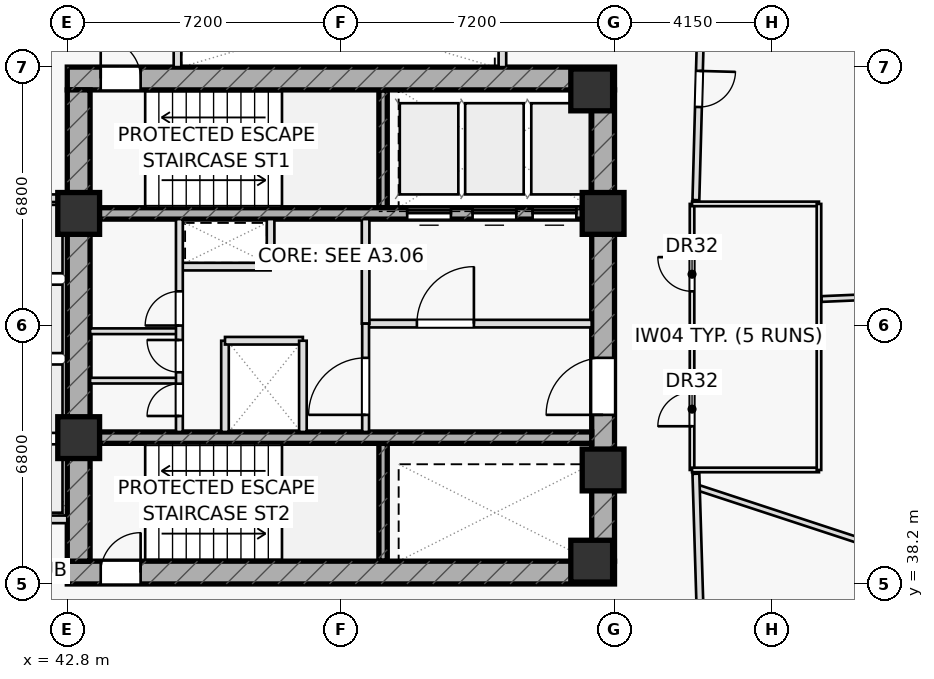
"""IFC4 building model, lengths in metres.
Left out: names, types, materials, properties, quantities, classifications, styles, units other than length and angle.
Written with IfcOpenShell. Run it as: python <this file> out.ifc"""

import sys

from ifc_helpers import new_model, si_unit, direction, frame, frame_2d, origin, origin_2d, place, context, subcontext, project, spatial, rectangle, extrude, element, fill, save


model = new_model("IFC4")
c1 = context("Model", 3, precision=1e-05, world=origin(), true_north=direction((0.0, 1.0)))
c2 = subcontext(c1, "Body", "Model", "MODEL_VIEW")
j1 = project(units=[si_unit("LENGTHUNIT", "METRE"), si_unit("PLANEANGLEUNIT", "RADIAN")], contexts=[c1])
p1 = place(None, origin())
s1 = spatial("IfcSite", under=j1, at=p1, CompositionType="ELEMENT")
p2 = place(p1, origin())
s2 = spatial("IfcBuilding", under=s1, at=p2, CompositionType="ELEMENT")
p3 = place(p2, frame((0.0, 0.0, 39.3)))
s3 = spatial("IfcBuildingStorey", under=s2, at=p3, CompositionType="ELEMENT", Elevation=39.3)
for number, where, z_axis, x_axis in (
    (1, (51.11, 48.1, 0.0), (0.0, 0.0, 1.0), (0.0, 1.0, 0.0)),
    (2, (51.11, 38.8, 0.0), (0.0, 0.0, 1.0), (0.0, 1.0, 0.0)),
):
    element("IfcWall", number, at=place(p3, frame(where, z_axis=z_axis, x_axis=x_axis)), inside=s3, PredefinedType="SHEAR", context=c2, shape_type="SweptSolid", body=[
        extrude(rectangle(XDim=3.1, YDim=0.22, at=frame_2d((1.55, 0.0))), origin(), (0.0, 0.0, 1.0), 3.6),
    ])
p4 = place(p3, frame((42.8, 51.5, 0.0), z_axis=(0.0, 0.0, 1.0), x_axis=(1.0, 0.0, 0.0)))
e3 = element("IfcWall", 3, at=p4, inside=s3, PredefinedType="SHEAR", context=c2, shape_type="SweptSolid", body=[
    extrude(rectangle(XDim=14.4, YDim=0.6, at=frame_2d((7.2, 0.0))), origin(), (0.0, 0.0, 1.0), 3.6),
])
p5 = place(p4, frame((0.88, 0.0, 0.0)))
e4 = element("IfcOpeningElement", 4, at=p5, cuts=e3, PredefinedType="OPENING", context=c2, shape_type="SweptSolid", body=[
    extrude(rectangle(XDim=1.05, YDim=2.2, at=frame_2d((0.525, 1.1))), frame((0.0, 0.31, 0.0), z_axis=(0.0, -1.0, 0.0), x_axis=(1.0, 0.0, 0.0)), (0.0, 0.0, 1.0), 0.62),
])
p6 = place(p3, frame((42.8, 38.5, 0.0), z_axis=(0.0, 0.0, 1.0), x_axis=(1.0, 0.0, 0.0)))
e5 = element("IfcWall", 5, at=p6, inside=s3, PredefinedType="SHEAR", context=c2, shape_type="SweptSolid", body=[
    extrude(rectangle(XDim=14.4, YDim=0.6, at=frame_2d((7.2, 0.0))), origin(), (0.0, 0.0, 1.0), 3.6),
])
p7 = place(p6, frame((0.88, 0.0, 0.0)))
e6 = element("IfcOpeningElement", 6, at=p7, cuts=e5, PredefinedType="OPENING", context=c2, shape_type="SweptSolid", body=[
    extrude(rectangle(XDim=1.05, YDim=2.2, at=frame_2d((0.525, 1.1))), frame((0.0, 0.31, 0.0), z_axis=(0.0, -1.0, 0.0), x_axis=(1.0, 0.0, 0.0)), (0.0, 0.0, 1.0), 0.62),
])
p8 = place(p3, frame((43.1, 38.8, 0.0), z_axis=(0.0, 0.0, 1.0), x_axis=(0.0, 1.0, 0.0)))
e7 = element("IfcWall", 7, at=p8, inside=s3, PredefinedType="SHEAR", context=c2, shape_type="SweptSolid", body=[
    extrude(rectangle(XDim=12.4, YDim=0.6, at=frame_2d((6.2, 0.0))), origin(), (0.0, 0.0, 1.0), 3.6),
])
p9 = place(p3, frame((56.9, 38.8, 0.0), z_axis=(0.0, 0.0, 1.0), x_axis=(0.0, 1.0, 0.0)))
e8 = element("IfcWall", 8, at=p9, inside=s3, PredefinedType="SHEAR", context=c2, shape_type="SweptSolid", body=[
    extrude(rectangle(XDim=12.4, YDim=0.6, at=frame_2d((6.2, 0.0))), origin(), (0.0, 0.0, 1.0), 3.6),
])
p10 = place(p9, frame((3.85, 0.0, 0.0)))
e9 = element("IfcOpeningElement", 9, at=p10, cuts=e8, PredefinedType="OPENING", context=c2, shape_type="SweptSolid", body=[
    extrude(rectangle(XDim=1.5, YDim=2.2, at=frame_2d((0.75, 1.1))), frame((0.0, 0.31, 0.0), z_axis=(0.0, -1.0, 0.0), x_axis=(1.0, 0.0, 0.0)), (0.0, 0.0, 1.0), 0.62),
])
p11 = place(p3, frame((43.4, 47.95, 0.0), z_axis=(0.0, 0.0, 1.0), x_axis=(1.0, 0.0, 0.0)))
e10 = element("IfcWall", 10, at=p11, inside=s3, PredefinedType="SHEAR", context=c2, shape_type="SweptSolid", body=[
    extrude(rectangle(XDim=13.2, YDim=0.3, at=frame_2d((6.6, 0.0))), origin(), (0.0, 0.0, 1.0), 3.6),
])
p12 = place(p11, frame((8.345, 0.0, 0.0)))
e11 = element("IfcOpeningElement", 11, at=p12, cuts=e10, PredefinedType="OPENING", context=c2, shape_type="SweptSolid", body=[
    extrude(rectangle(XDim=1.15, YDim=2.2, at=frame_2d((0.575, 1.1))), frame((0.0, 0.16, 0.0), z_axis=(0.0, -1.0, 0.0), x_axis=(1.0, 0.0, 0.0)), (0.0, 0.0, 1.0), 0.32),
])
p13 = place(p11, frame((10.065, 0.0, 0.0)))
e12 = element("IfcOpeningElement", 12, at=p13, cuts=e10, PredefinedType="OPENING", context=c2, shape_type="SweptSolid", body=[
    extrude(rectangle(XDim=1.15, YDim=2.2, at=frame_2d((0.575, 1.1))), frame((0.0, 0.16, 0.0), z_axis=(0.0, -1.0, 0.0), x_axis=(1.0, 0.0, 0.0)), (0.0, 0.0, 1.0), 0.32),
])
p14 = place(p11, frame((11.645, 0.0, 0.0)))
e13 = element("IfcOpeningElement", 13, at=p14, cuts=e10, PredefinedType="OPENING", context=c2, shape_type="SweptSolid", body=[
    extrude(rectangle(XDim=1.15, YDim=2.2, at=frame_2d((0.575, 1.1))), frame((0.0, 0.16, 0.0), z_axis=(0.0, -1.0, 0.0), x_axis=(1.0, 0.0, 0.0)), (0.0, 0.0, 1.0), 0.32),
])
p15 = place(p3, frame((43.4, 42.05, 0.0), z_axis=(0.0, 0.0, 1.0), x_axis=(1.0, 0.0, 0.0)))
e14 = element("IfcWall", 14, at=p15, inside=s3, PredefinedType="SHEAR", context=c2, shape_type="SweptSolid", body=[
    extrude(rectangle(XDim=13.2, YDim=0.3, at=frame_2d((6.6, 0.0))), origin(), (0.0, 0.0, 1.0), 3.6),
])
for number, where, z_axis, x_axis in (
    (15, (43.1, 47.95, 0.0), (0.0, 0.0, 1.0), (1.0, 0.0, 0.0)),
    (16, (56.9, 47.95, 0.0), (0.0, 0.0, 1.0), (1.0, 0.0, 0.0)),
    (17, (56.6, 51.2, 0.0), (0.0, 0.0, 1.0), (1.0, 0.0, 0.0)),
    (18, (43.1, 42.05, 0.0), (0.0, 0.0, 1.0), (1.0, 0.0, 0.0)),
    (19, (56.9, 41.2, 0.0), (0.0, 0.0, 1.0), (1.0, 0.0, 0.0)),
    (20, (56.6, 38.8, 0.0), (0.0, 0.0, 1.0), (1.0, 0.0, 0.0)),
):
    element("IfcColumn", number, at=place(p3, frame(where, z_axis=z_axis, x_axis=x_axis)), inside=s3, PredefinedType="COLUMN", context=c2, shape_type="SweptSolid", body=[
        extrude(rectangle(XDim=1.1, YDim=1.1, at=origin_2d()), origin(), (0.0, 0.0, 1.0), 3.6),
    ])
for number, where, z_axis, x_axis in (
    (21, (40.3, 39.9, 0.0), (0.0, 0.0, 1.0), (1.0, 0.0, 0.0)),
    (22, (40.3, 48.35, 0.0), (0.0, 0.0, 1.0), (1.0, 0.0, 0.0)),
    (23, (45.7, 51.8, 0.0), (0.0, 0.0, 1.0), (0.0, 1.0, 0.0)),
    (24, (54.25, 51.8, 0.0), (0.0, 0.0, 1.0), (0.0, 1.0, 0.0)),
):
    element("IfcWall", number, at=place(p3, frame(where, z_axis=z_axis, x_axis=x_axis)), inside=s3, PredefinedType="PARTITIONING", context=c2, shape_type="SweptSolid", body=[
        extrude(rectangle(XDim=2.5, YDim=0.2, at=frame_2d((1.25, 0.0))), origin(), (0.0, 0.0, 1.0), 3.6),
    ])
p16 = place(p3, frame((45.75, 46.55, 0.0), z_axis=(0.0, 0.0, 1.0), x_axis=(1.0, 0.0, 0.0)))
e25 = element("IfcWall", 25, at=p16, inside=s3, PredefinedType="PARTITIONING", context=c2, shape_type="SweptSolid", body=[
    extrude(rectangle(XDim=2.4, YDim=0.2, at=frame_2d((1.2, 0.0))), origin(), (0.0, 0.0, 1.0), 3.6),
])
p17 = place(p3, frame((48.15, 46.55, 0.0), z_axis=(0.0, 0.0, 1.0), x_axis=(0.0, 1.0, 0.0)))
e26 = element("IfcWall", 26, at=p17, inside=s3, PredefinedType="PARTITIONING", context=c2, shape_type="SweptSolid", body=[
    extrude(rectangle(XDim=1.25, YDim=0.2, at=frame_2d((0.625, 0.0))), origin(), (0.0, 0.0, 1.0), 3.6),
])
p18 = place(p3, frame((46.95, 42.2, 0.0), z_axis=(0.0, 0.0, 1.0), x_axis=(0.0, 1.0, 0.0)))
e27 = element("IfcWall", 27, at=p18, inside=s3, PredefinedType="PARTITIONING", context=c2, shape_type="SweptSolid", body=[
    extrude(rectangle(XDim=2.4, YDim=0.2, at=frame_2d((1.2, 0.0))), origin(), (0.0, 0.0, 1.0), 3.6),
])
p19 = place(p3, frame((46.95, 44.6, 0.0), z_axis=(0.0, 0.0, 1.0), x_axis=(1.0, 0.0, 0.0)))
e28 = element("IfcWall", 28, at=p19, inside=s3, PredefinedType="PARTITIONING", context=c2, shape_type="SweptSolid", body=[
    extrude(rectangle(XDim=2.05, YDim=0.2, at=frame_2d((1.025, 0.0))), origin(), (0.0, 0.0, 1.0), 3.6),
])
p20 = place(p3, frame((50.65, 45.05, 0.0), z_axis=(0.0, 0.0, 1.0), x_axis=(1.0, 0.0, 0.0)))
e29 = element("IfcWall", 29, at=p20, inside=s3, PredefinedType="PARTITIONING", context=c2, shape_type="SweptSolid", body=[
    extrude(rectangle(XDim=5.95, YDim=0.2, at=frame_2d((2.975, 0.0))), origin(), (0.0, 0.0, 1.0), 3.6),
])
p21 = place(p20, frame((1.35, 0.0, 0.0)))
e30 = element("IfcOpeningElement", 30, at=p21, cuts=e29, PredefinedType="OPENING", context=c2, shape_type="SweptSolid", body=[
    extrude(rectangle(XDim=1.5, YDim=2.2, at=frame_2d((0.75, 1.1))), frame((0.0, 0.11, 0.0), z_axis=(0.0, -1.0, 0.0), x_axis=(1.0, 0.0, 0.0)), (0.0, 0.0, 1.0), 0.22),
])
p22 = place(p3, frame((50.65, 45.05, 0.0), z_axis=(0.0, 0.0, 1.0), x_axis=(0.0, 1.0, 0.0)))
e31 = element("IfcWall", 31, at=p22, inside=s3, PredefinedType="PARTITIONING", context=c2, shape_type="SweptSolid", body=[
    extrude(rectangle(XDim=2.75, YDim=0.2, at=frame_2d((1.375, 0.0))), origin(), (0.0, 0.0, 1.0), 3.6),
])
p23 = place(p3, frame((50.65, 42.2, 0.0), z_axis=(0.0, 0.0, 1.0), x_axis=(0.0, 1.0, 0.0)))
e32 = element("IfcWall", 32, at=p23, inside=s3, PredefinedType="PARTITIONING", context=c2, shape_type="SweptSolid", body=[
    extrude(rectangle(XDim=2.85, YDim=0.18, at=frame_2d((1.425, 0.0))), origin(), (0.0, 0.0, 1.0), 3.6),
])
p24 = place(p23, frame((0.45, 0.0, 0.0)))
e33 = element("IfcOpeningElement", 33, at=p24, cuts=e32, PredefinedType="OPENING", context=c2, shape_type="SweptSolid", body=[
    extrude(rectangle(XDim=1.5, YDim=2.2, at=frame_2d((0.75, 1.1))), frame((0.0, 0.1, 0.0), z_axis=(0.0, -1.0, 0.0), x_axis=(1.0, 0.0, 0.0)), (0.0, 0.0, 1.0), 0.2),
])
for number, where, z_axis, x_axis in (
    (34, (43.4, 43.55, 0.0), (0.0, 0.0, 1.0), (1.0, 0.0, 0.0)),
    (35, (43.4, 44.85, 0.0), (0.0, 0.0, 1.0), (1.0, 0.0, 0.0)),
):
    element("IfcWall", number, at=place(p3, frame(where, z_axis=z_axis, x_axis=x_axis)), inside=s3, PredefinedType="PARTITIONING", context=c2, shape_type="SweptSolid", body=[
        extrude(rectangle(XDim=2.35, YDim=0.15, at=frame_2d((1.175, 0.0))), origin(), (0.0, 0.0, 1.0), 3.6),
    ])
p25 = place(p3, frame((45.75, 42.2, 0.0), z_axis=(0.0, 0.0, 1.0), x_axis=(0.0, 1.0, 0.0)))
e36 = element("IfcWall", 36, at=p25, inside=s3, PredefinedType="PARTITIONING", context=c2, shape_type="SweptSolid", body=[
    extrude(rectangle(XDim=5.6, YDim=0.18, at=frame_2d((2.8, 0.0))), origin(), (0.0, 0.0, 1.0), 3.6),
])
p26 = place(p25, frame((0.42, 0.0, 0.0)))
e37 = element("IfcOpeningElement", 37, at=p26, cuts=e36, PredefinedType="OPENING", context=c2, shape_type="SweptSolid", body=[
    extrude(rectangle(XDim=0.85, YDim=2.05, at=frame_2d((0.425, 1.025))), frame((0.0, 0.1, 0.0), z_axis=(0.0, -1.0, 0.0), x_axis=(1.0, 0.0, 0.0)), (0.0, 0.0, 1.0), 0.2),
])
p27 = place(p25, frame((1.57, 0.0, 0.0)))
e38 = element("IfcOpeningElement", 38, at=p27, cuts=e36, PredefinedType="OPENING", context=c2, shape_type="SweptSolid", body=[
    extrude(rectangle(XDim=0.85, YDim=2.05, at=frame_2d((0.425, 1.025))), frame((0.0, 0.1, 0.0), z_axis=(0.0, -1.0, 0.0), x_axis=(1.0, 0.0, 0.0)), (0.0, 0.0, 1.0), 0.2),
])
p28 = place(p25, frame((2.8, 0.0, 0.0)))
e39 = element("IfcOpeningElement", 39, at=p28, cuts=e36, PredefinedType="OPENING", context=c2, shape_type="SweptSolid", body=[
    extrude(rectangle(XDim=0.9, YDim=2.05, at=frame_2d((0.45, 1.025))), frame((0.0, 0.1, 0.0), z_axis=(0.0, -1.0, 0.0), x_axis=(1.0, 0.0, 0.0)), (0.0, 0.0, 1.0), 0.2),
])
p29 = place(p3, frame((59.24, 41.2, 0.0), z_axis=(0.0, 0.0, 1.0), x_axis=(0.0, 1.0, 0.0)))
e40 = element("IfcWall", 40, at=p29, inside=s3, PredefinedType="PARTITIONING", context=c2, shape_type="SweptSolid", body=[
    extrude(rectangle(XDim=7.0, YDim=0.12, at=frame_2d((3.5, 0.0))), origin(), (0.0, 0.0, 1.0), 3.6),
])
p30 = place(p29, frame((1.15, 0.0, 0.0)))
e41 = element("IfcOpeningElement", 41, at=p30, cuts=e40, PredefinedType="OPENING", context=c2, shape_type="SweptSolid", body=[
    extrude(rectangle(XDim=0.9, YDim=2.05, at=frame_2d((0.45, 1.025))), frame((0.0, 0.07, 0.0), z_axis=(0.0, -1.0, 0.0), x_axis=(1.0, 0.0, 0.0)), (0.0, 0.0, 1.0), 0.14),
])
p31 = place(p29, frame((4.7, 0.0, 0.0)))
e42 = element("IfcOpeningElement", 42, at=p31, cuts=e40, PredefinedType="OPENING", context=c2, shape_type="SweptSolid", body=[
    extrude(rectangle(XDim=0.9, YDim=2.05, at=frame_2d((0.45, 1.025))), frame((0.0, 0.07, 0.0), z_axis=(0.0, -1.0, 0.0), x_axis=(1.0, 0.0, 0.0)), (0.0, 0.0, 1.0), 0.14),
])
p32 = place(p3, frame((59.24, 41.2, 0.0), z_axis=(0.0, 0.0, 1.0), x_axis=(1.0, 0.0, 0.0)))
e43 = element("IfcWall", 43, at=p32, inside=s3, PredefinedType="PARTITIONING", context=c2, shape_type="SweptSolid", body=[
    extrude(rectangle(XDim=3.34, YDim=0.12, at=frame_2d((1.67, 0.0))), origin(), (0.0, 0.0, 1.0), 2.925),
])
for number, where, z_axis, x_axis in (
    (44, (59.24, 44.65, 0.0), (0.0, 0.0, 1.0), (1.0, 0.0, 0.0)),
    (45, (59.24, 48.2, 0.0), (0.0, 0.0, 1.0), (1.0, 0.0, 0.0)),
):
    element("IfcWall", number, at=place(p3, frame(where, z_axis=z_axis, x_axis=x_axis)), inside=s3, PredefinedType="PARTITIONING", context=c2, shape_type="SweptSolid", body=[
        extrude(rectangle(XDim=3.34, YDim=0.12, at=frame_2d((1.67, 0.0))), origin(), (0.0, 0.0, 1.0), 3.6),
    ])
p33 = place(p3, frame((62.58, 41.2, 0.0), z_axis=(0.0, 0.0, 1.0), x_axis=(0.0, 1.0, 0.0)))
e46 = element("IfcWall", 46, at=p33, inside=s3, PredefinedType="PARTITIONING", context=c2, shape_type="SweptSolid", body=[
    extrude(rectangle(XDim=7.0, YDim=0.12, at=frame_2d((3.5, 0.0))), origin(), (0.0, 0.0, 1.0), 3.6),
])
p34 = place(p3, frame((59.352, 40.748, 0.0), z_axis=(0.0, 0.0, 1.0), x_axis=(0.950115380338, -0.311898643866, 0.0)))
e47 = element("IfcWall", 47, at=p34, inside=s3, PredefinedType="PARTITIONING", context=c2, shape_type="SweptSolid", body=[
    extrude(rectangle(XDim=17.592, YDim=0.15, at=frame_2d((8.796, 0.0))), origin(), (0.0, 0.0, 1.0), 2.925),
])
p35 = place(p3, frame((62.65, 45.698, 0.0), z_axis=(0.0, 0.0, 1.0), x_axis=(0.999079170403, 0.042904676507, 0.0)))
e48 = element("IfcWall", 48, at=p35, inside=s3, PredefinedType="PARTITIONING", context=c2, shape_type="SweptSolid", body=[
    extrude(rectangle(XDim=10.624, YDim=0.15, at=frame_2d((5.312, 0.0))), origin(), (0.0, 0.0, 1.0), 2.975),
])
p36 = place(p35, frame((1.35, 0.0, 0.0)))
e49 = element("IfcOpeningElement", 49, at=p36, cuts=e48, PredefinedType="OPENING", context=c2, shape_type="SweptSolid", body=[
    extrude(rectangle(XDim=0.95, YDim=2.05, at=frame_2d((0.475, 1.025))), frame((0.0, 0.085, 0.0), z_axis=(0.0, -1.0, 0.0), x_axis=(1.0, 0.0, 0.0)), (0.0, 0.0, 1.0), 0.17),
])
p37 = place(p3, frame((59.559, 29.895, 0.0), z_axis=(0.0, 0.0, 1.0), x_axis=(0.727559251267, 0.686044849769, 0.0)))
e50 = element("IfcWall", 50, at=p37, inside=s3, PredefinedType="PARTITIONING", context=c2, shape_type="SweptSolid", body=[
    extrude(rectangle(XDim=11.662, YDim=0.15, at=frame_2d((5.831, 0.0))), origin(), (0.0, 0.0, 1.0), 2.925),
])
p38 = place(p37, frame((5.356, 0.0, 0.0)))
e51 = element("IfcOpeningElement", 51, at=p38, cuts=e50, PredefinedType="OPENING", context=c2, shape_type="SweptSolid", body=[
    extrude(rectangle(XDim=0.95, YDim=2.05, at=frame_2d((0.475, 1.025))), frame((0.0, 0.085, 0.0), z_axis=(0.0, -1.0, 0.0), x_axis=(1.0, 0.0, 0.0)), (0.0, 0.0, 1.0), 0.17),
])
p39 = place(p3, frame((59.501, 54.15, 0.0), z_axis=(0.0, 0.0, 1.0), x_axis=(-0.027367567602, -0.999625437973, 0.0)))
e52 = element("IfcWall", 52, at=p39, inside=s3, PredefinedType="PARTITIONING", context=c2, shape_type="SweptSolid", body=[
    extrude(rectangle(XDim=5.852, YDim=0.18, at=frame_2d((2.926, 0.0))), origin(), (0.0, 0.0, 1.0), 2.925),
])
p40 = place(p39, frame((2.451, 0.0, 0.0)))
e53 = element("IfcOpeningElement", 53, at=p40, cuts=e52, PredefinedType="OPENING", context=c2, shape_type="SweptSolid", body=[
    extrude(rectangle(XDim=0.95, YDim=2.05, at=frame_2d((0.475, 1.025))), frame((0.0, 0.1, 0.0), z_axis=(0.0, -1.0, 0.0), x_axis=(1.0, 0.0, 0.0)), (0.0, 0.0, 1.0), 0.2),
])
p41 = place(p3, frame((59.342, 41.1, 0.0), z_axis=(0.0, 0.0, 1.0), x_axis=(0.030445329425, -0.999536433511, 0.0)))
e54 = element("IfcWall", 54, at=p41, inside=s3, PredefinedType="PARTITIONING", context=c2, shape_type="SweptSolid", body=[
    extrude(rectangle(XDim=5.252, YDim=0.18, at=frame_2d((2.626, 0.0))), origin(), (0.0, 0.0, 1.0), 2.925),
])
p42 = place(p3, frame((49.0, 42.2, 0.0), z_axis=(0.0, 0.0, 1.0), x_axis=(0.0, 1.0, 0.0)))
e55 = element("IfcWall", 55, at=p42, inside=s3, PredefinedType="PARTITIONING", context=c2, shape_type="SweptSolid", body=[
    extrude(rectangle(XDim=2.4, YDim=0.2, at=frame_2d((1.2, 0.0))), origin(), (0.0, 0.0, 1.0), 3.6),
])
p43 = place(p5, origin())
e56 = element("IfcDoor", 56, at=p43, inside=s3, OperationType="SINGLE_SWING_LEFT", PredefinedType="DOOR", context=c2, shape_type="SweptSolid", body=[
    extrude(rectangle(XDim=1.05, YDim=2.2, at=frame_2d((0.525, 1.1))), frame((0.0, 0.025, 0.0), z_axis=(0.0, -1.0, 0.0), x_axis=(1.0, 0.0, 0.0)), (0.0, 0.0, 1.0), 0.05),
])
fill(e4, e56)
p44 = place(p7, origin())
e57 = element("IfcDoor", 57, at=p44, inside=s3, OperationType="SINGLE_SWING_RIGHT", PredefinedType="DOOR", context=c2, shape_type="SweptSolid", body=[
    extrude(rectangle(XDim=1.05, YDim=2.2, at=frame_2d((0.525, 1.1))), frame((0.0, 0.025, 0.0), z_axis=(0.0, -1.0, 0.0), x_axis=(1.0, 0.0, 0.0)), (0.0, 0.0, 1.0), 0.05),
])
fill(e6, e57)
p45 = place(p10, origin())
e58 = element("IfcDoor", 58, at=p45, inside=s3, OperationType="SINGLE_SWING_LEFT", PredefinedType="DOOR", context=c2, shape_type="SweptSolid", body=[
    extrude(rectangle(XDim=1.5, YDim=2.2, at=frame_2d((0.75, 1.1))), frame((0.0, 0.025, 0.0), z_axis=(0.0, -1.0, 0.0), x_axis=(1.0, 0.0, 0.0)), (0.0, 0.0, 1.0), 0.05),
])
fill(e9, e58)
p46 = place(p21, origin())
e59 = element("IfcDoor", 59, at=p46, inside=s3, OperationType="SINGLE_SWING_RIGHT", PredefinedType="DOOR", context=c2, shape_type="SweptSolid", body=[
    extrude(rectangle(XDim=1.5, YDim=2.2, at=frame_2d((0.75, 1.1))), frame((0.0, 0.025, 0.0), z_axis=(0.0, -1.0, 0.0), x_axis=(1.0, 0.0, 0.0)), (0.0, 0.0, 1.0), 0.05),
])
fill(e30, e59)
p47 = place(p24, origin())
e60 = element("IfcDoor", 60, at=p47, inside=s3, OperationType="SINGLE_SWING_LEFT", PredefinedType="DOOR", context=c2, shape_type="SweptSolid", body=[
    extrude(rectangle(XDim=1.5, YDim=2.2, at=frame_2d((0.75, 1.1))), frame((0.0, 0.025, 0.0), z_axis=(0.0, -1.0, 0.0), x_axis=(1.0, 0.0, 0.0)), (0.0, 0.0, 1.0), 0.05),
])
fill(e33, e60)
p48 = place(p26, origin())
e61 = element("IfcDoor", 61, at=p48, inside=s3, OperationType="SINGLE_SWING_LEFT", PredefinedType="DOOR", context=c2, shape_type="SweptSolid", body=[
    extrude(rectangle(XDim=0.85, YDim=2.05, at=frame_2d((0.425, 1.025))), frame((0.0, 0.025, 0.0), z_axis=(0.0, -1.0, 0.0), x_axis=(1.0, 0.0, 0.0)), (0.0, 0.0, 1.0), 0.05),
])
fill(e37, e61)
p49 = place(p27, origin())
e62 = element("IfcDoor", 62, at=p49, inside=s3, OperationType="SINGLE_SWING_RIGHT", PredefinedType="DOOR", context=c2, shape_type="SweptSolid", body=[
    extrude(rectangle(XDim=0.85, YDim=2.05, at=frame_2d((0.425, 1.025))), frame((0.0, 0.025, 0.0), z_axis=(0.0, -1.0, 0.0), x_axis=(1.0, 0.0, 0.0)), (0.0, 0.0, 1.0), 0.05),
])
fill(e38, e62)
p50 = place(p28, origin())
e63 = element("IfcDoor", 63, at=p50, inside=s3, OperationType="SINGLE_SWING_LEFT", PredefinedType="DOOR", context=c2, shape_type="SweptSolid", body=[
    extrude(rectangle(XDim=0.9, YDim=2.05, at=frame_2d((0.45, 1.025))), frame((0.0, 0.025, 0.0), z_axis=(0.0, -1.0, 0.0), x_axis=(1.0, 0.0, 0.0)), (0.0, 0.0, 1.0), 0.05),
])
fill(e39, e63)
p51 = place(p30, origin())
e64 = element("IfcDoor", 64, at=p51, inside=s3, OperationType="SINGLE_SWING_LEFT", PredefinedType="DOOR", context=c2, shape_type="SweptSolid", body=[
    extrude(rectangle(XDim=0.9, YDim=2.05, at=frame_2d((0.45, 1.025))), frame((0.0, 0.025, 0.0), z_axis=(0.0, -1.0, 0.0), x_axis=(1.0, 0.0, 0.0)), (0.0, 0.0, 1.0), 0.05),
])
fill(e41, e64)
p52 = place(p31, origin())
e65 = element("IfcDoor", 65, at=p52, inside=s3, OperationType="SINGLE_SWING_RIGHT", PredefinedType="DOOR", context=c2, shape_type="SweptSolid", body=[
    extrude(rectangle(XDim=0.9, YDim=2.05, at=frame_2d((0.45, 1.025))), frame((0.0, 0.025, 0.0), z_axis=(0.0, -1.0, 0.0), x_axis=(1.0, 0.0, 0.0)), (0.0, 0.0, 1.0), 0.05),
])
fill(e42, e65)
p53 = place(p40, origin())
e66 = element("IfcDoor", 66, at=p53, inside=s3, OperationType="SINGLE_SWING_LEFT", PredefinedType="DOOR", context=c2, shape_type="SweptSolid", body=[
    extrude(rectangle(XDim=0.95, YDim=2.05, at=frame_2d((0.475, 1.025))), frame((0.0, 0.025, 0.0), z_axis=(0.0, -1.0, 0.0), x_axis=(1.0, 0.0, 0.0)), (0.0, 0.0, 1.0), 0.05),
])
fill(e53, e66)
p54 = place(p12, origin())
e67 = element("IfcDoor", 67, at=p54, inside=s3, OperationType="SLIDING_TO_LEFT", PredefinedType="DOOR", context=c2, shape_type="SweptSolid", body=[
    extrude(rectangle(XDim=1.15, YDim=2.2, at=frame_2d((0.575, 1.1))), frame((0.0, 0.025, 0.0), z_axis=(0.0, -1.0, 0.0), x_axis=(1.0, 0.0, 0.0)), (0.0, 0.0, 1.0), 0.05),
])
fill(e11, e67)
p55 = place(p13, origin())
e68 = element("IfcDoor", 68, at=p55, inside=s3, OperationType="SLIDING_TO_LEFT", PredefinedType="DOOR", context=c2, shape_type="SweptSolid", body=[
    extrude(rectangle(XDim=1.15, YDim=2.2, at=frame_2d((0.575, 1.1))), frame((0.0, 0.025, 0.0), z_axis=(0.0, -1.0, 0.0), x_axis=(1.0, 0.0, 0.0)), (0.0, 0.0, 1.0), 0.05),
])
fill(e12, e68)
p56 = place(p14, origin())
e69 = element("IfcDoor", 69, at=p56, inside=s3, OperationType="SLIDING_TO_LEFT", PredefinedType="DOOR", context=c2, shape_type="SweptSolid", body=[
    extrude(rectangle(XDim=1.15, YDim=2.2, at=frame_2d((0.575, 1.1))), frame((0.0, 0.025, 0.0), z_axis=(0.0, -1.0, 0.0), x_axis=(1.0, 0.0, 0.0)), (0.0, 0.0, 1.0), 0.05),
])
fill(e13, e69)
save(model, sys.argv[1])
